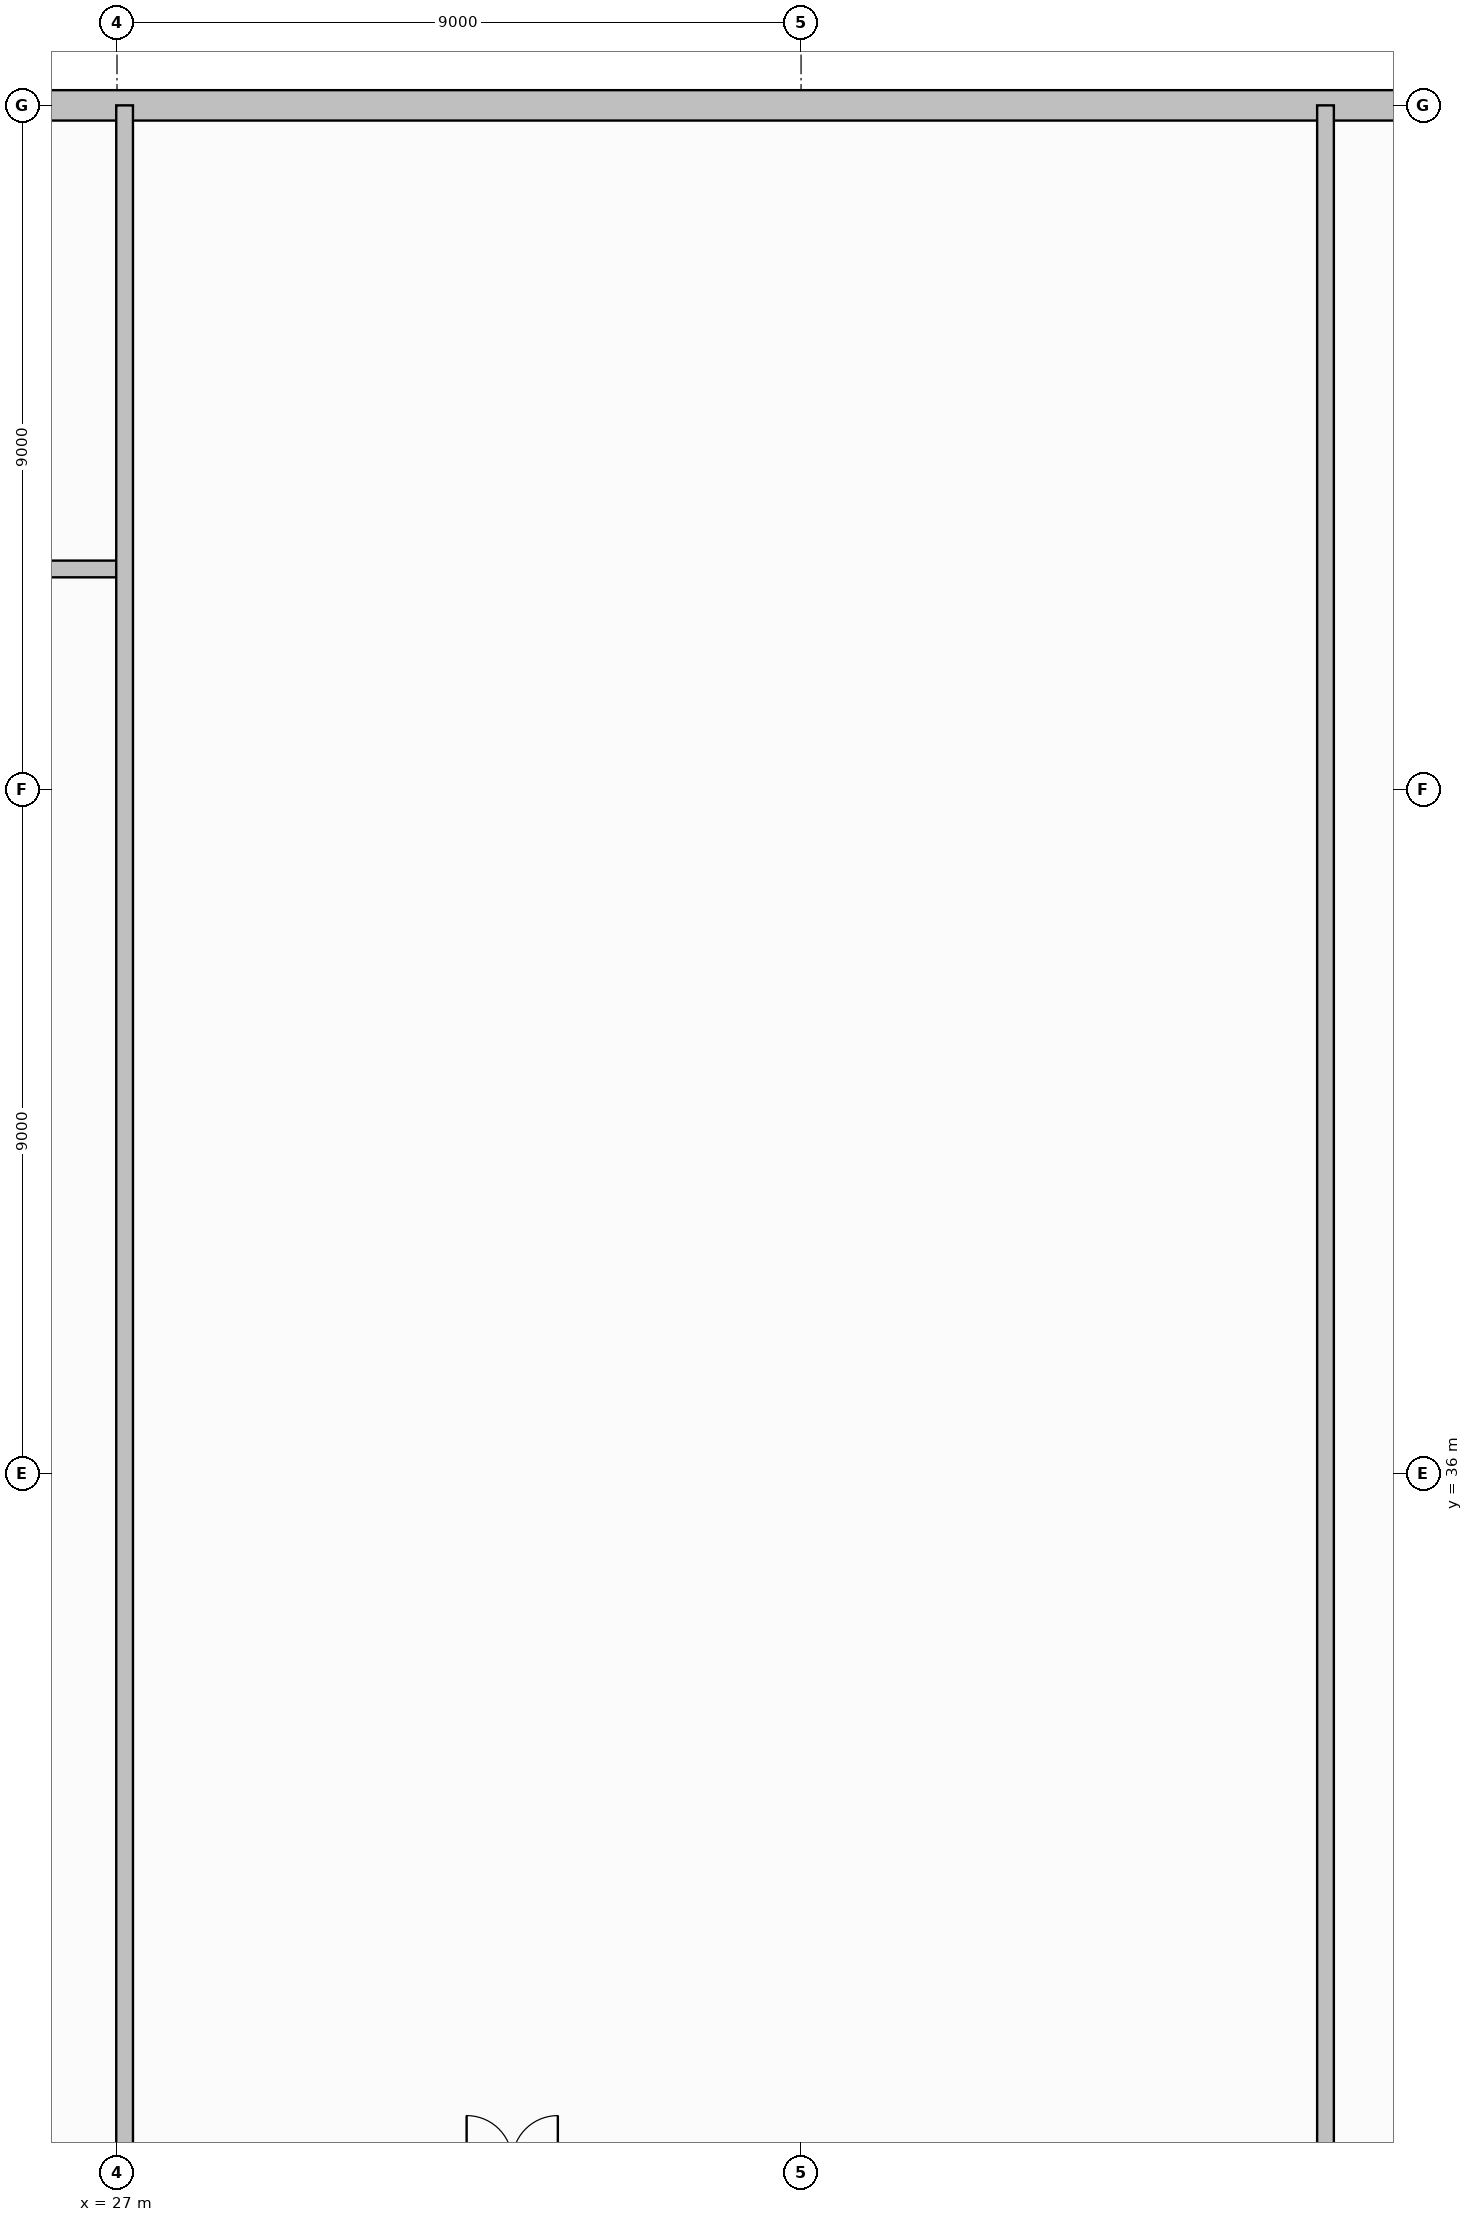
"""IFC4 building model, lengths in metres.
Left out: names, types, materials, properties, quantities, classifications, styles, units other than length and angle.
Written with IfcOpenShell. Run it as: python <this file> out.ifc"""

import sys

from ifc_helpers import new_model, si_unit, direction, frame, frame_2d, origin, origin_2d, place, context, subcontext, project, spatial, rectangle, i_section, extrude, element, fill, save


model = new_model("IFC4")
c1 = context("Model", 3, precision=1e-05, world=origin(), true_north=direction((0.0, 1.0)))
c2 = subcontext(c1, "Body", "Model", "MODEL_VIEW")
j1 = project(units=[si_unit("LENGTHUNIT", "METRE"), si_unit("PLANEANGLEUNIT", "RADIAN")], contexts=[c1])
p1 = place(None, origin())
s1 = spatial("IfcSite", under=j1, at=p1, CompositionType="ELEMENT")
p2 = place(p1, origin())
s2 = spatial("IfcBuilding", under=s1, at=p2, CompositionType="ELEMENT")
p3 = place(p2, origin())
s3 = spatial("IfcBuildingStorey", under=s2, at=p3, CompositionType="ELEMENT", Elevation=0.0)
for number, where, z_axis, x_axis in (
    (1, (27.0, 27.0, 0.0), (0.0, 0.0, 1.0), (1.0, 0.0, 0.0)),
    (2, (27.0, 36.0, 0.0), (0.0, 0.0, 1.0), (1.0, 0.0, 0.0)),
    (3, (27.0, 45.0, 0.0), (0.0, 0.0, 1.0), (1.0, 0.0, 0.0)),
    (4, (27.0, 54.0, 0.0), (0.0, 0.0, 1.0), (1.0, 0.0, 0.0)),
    (5, (36.0, 27.0, 0.0), (0.0, 0.0, 1.0), (1.0, 0.0, 0.0)),
    (6, (36.0, 36.0, 0.0), (0.0, 0.0, 1.0), (1.0, 0.0, 0.0)),
    (7, (36.0, 45.0, 0.0), (0.0, 0.0, 1.0), (1.0, 0.0, 0.0)),
    (8, (36.0, 54.0, 0.0), (0.0, 0.0, 1.0), (1.0, 0.0, 0.0)),
):
    element("IfcColumn", number, at=place(p3, frame(where, z_axis=z_axis, x_axis=x_axis)), inside=s3, PredefinedType="COLUMN", context=c2, shape_type="SweptSolid", body=[
        extrude(i_section(OverallWidth=0.454, OverallDepth=0.569, WebThickness=0.078, FlangeThickness=0.125, FilletRadius=0.015, at=origin_2d()), origin(), (0.0, 0.0, 1.0), 5.8),
    ])
p4 = place(p3, frame((0.2, 54.0, 0.0), z_axis=(0.0, 0.0, 1.0), x_axis=(1.0, 0.0, 0.0)))
e9 = element("IfcWall", 9, at=p4, inside=s3, PredefinedType="SOLIDWALL", context=c2, shape_type="SweptSolid", body=[
    extrude(rectangle(XDim=62.6, YDim=0.4, at=frame_2d((31.3, 0.0))), origin(), (0.0, 0.0, 1.0), 5.48),
])
p5 = place(p4, frame((4.1, 0.0, 1.1)))
e10 = element("IfcOpeningElement", 10, at=p5, cuts=e9, PredefinedType="OPENING", context=c2, shape_type="SweptSolid", body=[
    extrude(rectangle(XDim=1.2, YDim=1.5, at=frame_2d((0.6, 0.75))), frame((0.0, 0.21, 0.0), z_axis=(0.0, -1.0, 0.0), x_axis=(1.0, 0.0, 0.0)), (0.0, 0.0, 1.0), 0.42),
])
p6 = place(p4, frame((12.5, 0.0, 1.1)))
e11 = element("IfcOpeningElement", 11, at=p6, cuts=e9, PredefinedType="OPENING", context=c2, shape_type="SweptSolid", body=[
    extrude(rectangle(XDim=2.4, YDim=1.95, at=frame_2d((1.2, 0.975))), frame((0.0, 0.21, 0.0), z_axis=(0.0, -1.0, 0.0), x_axis=(1.0, 0.0, 0.0)), (0.0, 0.0, 1.0), 0.42),
])
p7 = place(p4, frame((21.35, 0.0, 1.1)))
e12 = element("IfcOpeningElement", 12, at=p7, cuts=e9, PredefinedType="OPENING", context=c2, shape_type="SweptSolid", body=[
    extrude(rectangle(XDim=2.7, YDim=2.1, at=frame_2d((1.35, 1.05))), frame((0.0, 0.21, 0.0), z_axis=(0.0, -1.0, 0.0), x_axis=(1.0, 0.0, 0.0)), (0.0, 0.0, 1.0), 0.42),
])
p8 = place(p4, frame((30.2, 0.0, 1.1)))
e13 = element("IfcOpeningElement", 13, at=p8, cuts=e9, PredefinedType="OPENING", context=c2, shape_type="SweptSolid", body=[
    extrude(rectangle(XDim=3.0, YDim=2.25, at=frame_2d((1.5, 1.125))), frame((0.0, 0.21, 0.0), z_axis=(0.0, -1.0, 0.0), x_axis=(1.0, 0.0, 0.0)), (0.0, 0.0, 1.0), 0.42),
])
p9 = place(p4, frame((48.575, 0.0, 1.1)))
e14 = element("IfcOpeningElement", 14, at=p9, cuts=e9, PredefinedType="OPENING", context=c2, shape_type="SweptSolid", body=[
    extrude(rectangle(XDim=2.25, YDim=2.1, at=frame_2d((1.125, 1.05))), frame((0.0, 0.21, 0.0), z_axis=(0.0, -1.0, 0.0), x_axis=(1.0, 0.0, 0.0)), (0.0, 0.0, 1.0), 0.42),
])
p10 = place(p4, frame((57.425, 0.0, 1.1)))
e15 = element("IfcOpeningElement", 15, at=p10, cuts=e9, PredefinedType="OPENING", context=c2, shape_type="SweptSolid", body=[
    extrude(rectangle(XDim=2.55, YDim=2.25, at=frame_2d((1.275, 1.125))), frame((0.0, 0.21, 0.0), z_axis=(0.0, -1.0, 0.0), x_axis=(1.0, 0.0, 0.0)), (0.0, 0.0, 1.0), 0.42),
])
p11 = place(p3, frame((0.0, 47.9, 0.0), z_axis=(0.0, 0.0, 1.0), x_axis=(1.0, 0.0, 0.0)))
e16 = element("IfcWall", 16, at=p11, inside=s3, PredefinedType="PARTITIONING", context=c2, shape_type="SweptSolid", body=[
    extrude(rectangle(XDim=27.1, YDim=0.22, at=frame_2d((13.55, 0.0))), origin(), (0.0, 0.0, 1.0), 4.605),
])
p12 = place(p11, frame((13.5, 0.0, 0.0)))
e17 = element("IfcOpeningElement", 17, at=p12, cuts=e16, PredefinedType="OPENING", context=c2, shape_type="SweptSolid", body=[
    extrude(rectangle(XDim=1.1, YDim=2.15, at=frame_2d((0.55, 1.075))), frame((0.0, 0.12, 0.0), z_axis=(0.0, -1.0, 0.0), x_axis=(1.0, 0.0, 0.0)), (0.0, 0.0, 1.0), 0.24),
])
p13 = place(p11, frame((3.0, 0.0, 0.0)))
e18 = element("IfcOpeningElement", 18, at=p13, cuts=e16, PredefinedType="OPENING", context=c2, shape_type="SweptSolid", body=[
    extrude(rectangle(XDim=1.0, YDim=2.15, at=frame_2d((0.5, 1.075))), frame((0.0, 0.12, 0.0), z_axis=(0.0, -1.0, 0.0), x_axis=(1.0, 0.0, 0.0)), (0.0, 0.0, 1.0), 0.24),
])
p14 = place(p3, frame((42.9, 24.6, 0.0), z_axis=(0.0, 0.0, 1.0), x_axis=(0.0, 1.0, 0.0)))
e19 = element("IfcWall", 19, at=p14, inside=s3, PredefinedType="PARTITIONING", context=c2, shape_type="SweptSolid", body=[
    extrude(rectangle(XDim=29.4, YDim=0.22, at=frame_2d((14.7, 0.0))), origin(), (0.0, 0.0, 1.0), 4.533),
])
p15 = place(p14, frame((0.7, 0.0, 0.0)))
e20 = element("IfcOpeningElement", 20, at=p15, cuts=e19, PredefinedType="OPENING", context=c2, shape_type="SweptSolid", body=[
    extrude(rectangle(XDim=1.2, YDim=2.15, at=frame_2d((0.6, 1.075))), frame((0.0, 0.12, 0.0), z_axis=(0.0, -1.0, 0.0), x_axis=(1.0, 0.0, 0.0)), (0.0, 0.0, 1.0), 0.24),
])
p16 = place(p3, frame((27.1, 26.95, 0.0), z_axis=(0.0, 0.0, 1.0), x_axis=(0.0, 1.0, 0.0)))
e21 = element("IfcWall", 21, at=p16, inside=s3, PredefinedType="PARTITIONING", context=c2, shape_type="SweptSolid", body=[
    extrude(rectangle(XDim=27.05, YDim=0.22, at=frame_2d((13.525, 0.0))), origin(), (0.0, 0.0, 1.0), 4.533),
])
p17 = place(p8, origin())
e22 = element("IfcWindow", 22, at=p17, inside=s3, PartitioningType="SINGLE_PANEL", PredefinedType="WINDOW", context=c2, shape_type="SweptSolid", body=[
    extrude(rectangle(XDim=3.0, YDim=2.25, at=frame_2d((1.5, 1.125))), frame((0.0, 0.03, 0.0), z_axis=(0.0, -1.0, 0.0), x_axis=(1.0, 0.0, 0.0)), (0.0, 0.0, 1.0), 0.06),
])
fill(e13, e22)
save(model, sys.argv[1])
